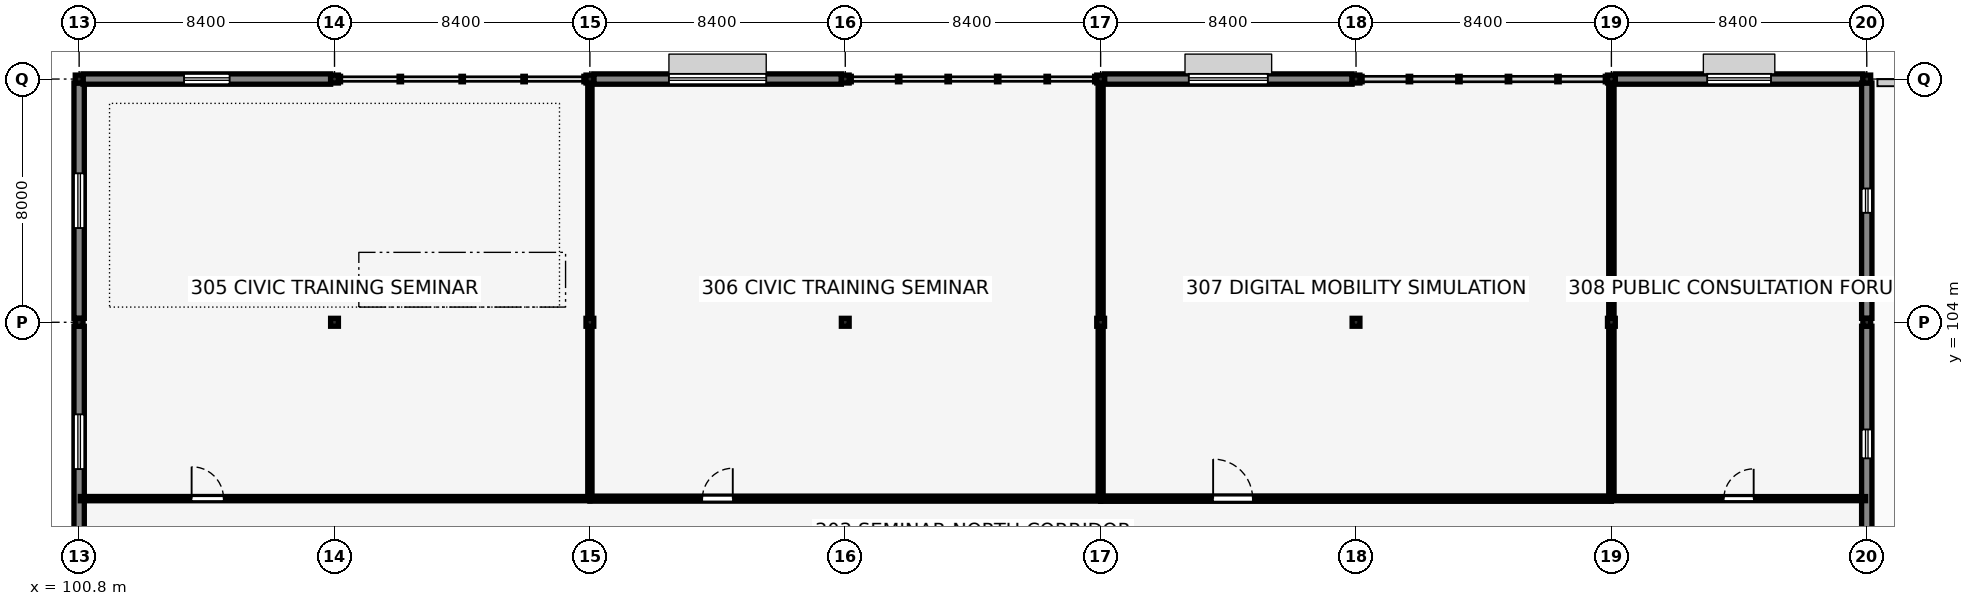
"""IFC4 building model, lengths in metres.
Left out: names, types, materials, properties, quantities, classifications, styles, units other than length and angle.
Written with IfcOpenShell. Run it as: python <this file> out.ifc"""

import sys

from ifc_helpers import new_model, si_unit, direction, frame, frame_2d, origin, origin_2d, place, context, subcontext, project, spatial, rectangle, i_section, extrude, element, fill, save


model = new_model("IFC4")
c1 = context("Model", 3, precision=1e-05, world=origin(), true_north=direction((0.0, 1.0)))
c2 = subcontext(c1, "Body", "Model", "MODEL_VIEW")
j1 = project(units=[si_unit("LENGTHUNIT", "METRE"), si_unit("PLANEANGLEUNIT", "RADIAN")], contexts=[c1])
p1 = place(None, origin())
s1 = spatial("IfcSite", under=j1, at=p1, CompositionType="ELEMENT")
p2 = place(p1, origin())
s2 = spatial("IfcBuilding", under=s1, at=p2, CompositionType="ELEMENT")
p3 = place(p2, frame((0.0, 0.0, 13.36)))
s3 = spatial("IfcBuildingStorey", under=s2, at=p3, CompositionType="ELEMENT", Elevation=13.36)
for number, where, z_axis, x_axis in (
    (1, (100.8, 104.0, 0.0), (0.0, 0.0, 1.0), (1.0, 0.0, 0.0)),
    (2, (100.8, 112.0, 0.0), (0.0, 0.0, 1.0), (1.0, 0.0, 0.0)),
    (3, (109.2, 104.0, 0.0), (0.0, 0.0, 1.0), (1.0, 0.0, 0.0)),
    (4, (109.2, 112.0, 0.0), (0.0, 0.0, 1.0), (1.0, 0.0, 0.0)),
    (5, (117.6, 104.0, 0.0), (0.0, 0.0, 1.0), (1.0, 0.0, 0.0)),
    (6, (117.6, 112.0, 0.0), (0.0, 0.0, 1.0), (1.0, 0.0, 0.0)),
    (7, (126.0, 104.0, 0.0), (0.0, 0.0, 1.0), (1.0, 0.0, 0.0)),
    (8, (126.0, 112.0, 0.0), (0.0, 0.0, 1.0), (1.0, 0.0, 0.0)),
    (9, (134.4, 104.0, 0.0), (0.0, 0.0, 1.0), (1.0, 0.0, 0.0)),
    (10, (134.4, 112.0, 0.0), (0.0, 0.0, 1.0), (1.0, 0.0, 0.0)),
    (11, (142.8, 104.0, 0.0), (0.0, 0.0, 1.0), (1.0, 0.0, 0.0)),
    (12, (142.8, 112.0, 0.0), (0.0, 0.0, 1.0), (1.0, 0.0, 0.0)),
    (13, (151.2, 104.0, 0.0), (0.0, 0.0, 1.0), (1.0, 0.0, 0.0)),
    (14, (151.2, 112.0, 0.0), (0.0, 0.0, 1.0), (1.0, 0.0, 0.0)),
    (15, (159.6, 104.0, 0.0), (0.0, 0.0, 1.0), (1.0, 0.0, 0.0)),
    (16, (159.6, 112.0, 0.0), (0.0, 0.0, 1.0), (1.0, 0.0, 0.0)),
):
    element("IfcColumn", number, at=place(p3, frame(where, z_axis=z_axis, x_axis=x_axis)), inside=s3, PredefinedType="COLUMN", context=c2, shape_type="SweptSolid", body=[
        extrude(i_section(OverallWidth=0.256, OverallDepth=0.26, WebThickness=0.01, FlangeThickness=0.017, FilletRadius=0.013, at=origin_2d()), origin(), (0.0, 0.0, 1.0), 3.58),
    ])
p4 = place(p3, frame((100.8, 96.275, 0.0), z_axis=(0.0, 0.0, 1.0), x_axis=(0.0, 1.0, 0.0)))
e17 = element("IfcWall", 17, at=p4, inside=s3, PredefinedType="SOLIDWALL", context=c2, shape_type="SweptSolid", body=[
    extrude(rectangle(XDim=7.595, YDim=0.34, at=frame_2d((3.797, 0.0))), origin(), (0.0, 0.0, 1.0), 3.28),
])
p5 = place(p4, frame((2.897, 0.0, 0.9), z_axis=(0.0, 0.0, 1.0), x_axis=(1.0, 0.0, 0.0)))
e18 = element("IfcOpeningElement", 18, at=p5, cuts=e17, PredefinedType="OPENING", context=c2, shape_type="SweptSolid", body=[
    extrude(rectangle(XDim=1.8, YDim=1.45, at=frame_2d((0.9, 0.725))), frame((0.0, 0.18, 0.0), z_axis=(0.0, -1.0, 0.0), x_axis=(1.0, 0.0, 0.0)), (0.0, 0.0, 1.0), 0.36),
])
p6 = place(p3, frame((100.8, 104.13, 0.0), z_axis=(0.0, 0.0, 1.0), x_axis=(0.0, 1.0, 0.0)))
e19 = element("IfcWall", 19, at=p6, inside=s3, PredefinedType="SOLIDWALL", context=c2, shape_type="SweptSolid", body=[
    extrude(rectangle(XDim=7.74, YDim=0.34, at=frame_2d((3.87, 0.0))), origin(), (0.0, 0.0, 1.0), 3.28),
])
p7 = place(p6, frame((2.97, 0.0, 0.9), z_axis=(0.0, 0.0, 1.0), x_axis=(1.0, 0.0, 0.0)))
e20 = element("IfcOpeningElement", 20, at=p7, cuts=e19, PredefinedType="OPENING", context=c2, shape_type="SweptSolid", body=[
    extrude(rectangle(XDim=1.8, YDim=1.3, at=frame_2d((0.9, 0.65))), frame((0.0, 0.18, 0.0), z_axis=(0.0, -1.0, 0.0), x_axis=(1.0, 0.0, 0.0)), (0.0, 0.0, 1.0), 0.36),
])
p8 = place(p3, frame((100.928, 112.0, 0.0), z_axis=(0.0, 0.0, 1.0), x_axis=(1.0, 0.0, 0.0)))
e21 = element("IfcWall", 21, at=p8, inside=s3, PredefinedType="SOLIDWALL", context=c2, shape_type="SweptSolid", body=[
    extrude(rectangle(XDim=8.144, YDim=0.34, at=frame_2d((4.072, 0.0))), origin(), (0.0, 0.0, 1.0), 3.28),
])
p9 = place(p8, frame((3.322, 0.0, 0.9), z_axis=(0.0, 0.0, 1.0), x_axis=(1.0, 0.0, 0.0)))
e22 = element("IfcOpeningElement", 22, at=p9, cuts=e21, PredefinedType="OPENING", context=c2, shape_type="SweptSolid", body=[
    extrude(rectangle(XDim=1.5, YDim=1.4, at=frame_2d((0.75, 0.7))), frame((0.0, 0.18, 0.0), z_axis=(0.0, -1.0, 0.0), x_axis=(1.0, 0.0, 0.0)), (0.0, 0.0, 1.0), 0.36),
])
p10 = place(p3, frame((117.728, 112.0, 0.0), z_axis=(0.0, 0.0, 1.0), x_axis=(1.0, 0.0, 0.0)))
e23 = element("IfcWall", 23, at=p10, inside=s3, PredefinedType="SOLIDWALL", context=c2, shape_type="SweptSolid", body=[
    extrude(rectangle(XDim=8.144, YDim=0.34, at=frame_2d((4.072, 0.0))), origin(), (0.0, 0.0, 1.0), 3.28),
])
p11 = place(p10, frame((2.472, 0.0, 1.55), z_axis=(0.0, 0.0, 1.0), x_axis=(1.0, 0.0, 0.0)))
e24 = element("IfcOpeningElement", 24, at=p11, cuts=e23, PredefinedType="OPENING", context=c2, shape_type="SweptSolid", body=[
    extrude(rectangle(XDim=3.2, YDim=0.9, at=frame_2d((1.6, 0.45))), frame((0.0, 0.18, 0.0), z_axis=(0.0, -1.0, 0.0), x_axis=(1.0, 0.0, 0.0)), (0.0, 0.0, 1.0), 0.36),
])
p12 = place(p3, frame((134.528, 112.0, 0.0), z_axis=(0.0, 0.0, 1.0), x_axis=(1.0, 0.0, 0.0)))
e25 = element("IfcWall", 25, at=p12, inside=s3, PredefinedType="SOLIDWALL", context=c2, shape_type="SweptSolid", body=[
    extrude(rectangle(XDim=8.144, YDim=0.34, at=frame_2d((4.072, 0.0))), origin(), (0.0, 0.0, 1.0), 3.28),
])
p13 = place(p12, frame((2.772, 0.0, 1.55), z_axis=(0.0, 0.0, 1.0), x_axis=(1.0, 0.0, 0.0)))
e26 = element("IfcOpeningElement", 26, at=p13, cuts=e25, PredefinedType="OPENING", context=c2, shape_type="SweptSolid", body=[
    extrude(rectangle(XDim=2.6, YDim=0.85, at=frame_2d((1.3, 0.425))), frame((0.0, 0.18, 0.0), z_axis=(0.0, -1.0, 0.0), x_axis=(1.0, 0.0, 0.0)), (0.0, 0.0, 1.0), 0.36),
])
p14 = place(p3, frame((151.328, 112.0, 0.0), z_axis=(0.0, 0.0, 1.0), x_axis=(1.0, 0.0, 0.0)))
e27 = element("IfcWall", 27, at=p14, inside=s3, PredefinedType="SOLIDWALL", context=c2, shape_type="SweptSolid", body=[
    extrude(rectangle(XDim=8.144, YDim=0.34, at=frame_2d((4.072, 0.0))), origin(), (0.0, 0.0, 1.0), 3.28),
])
p15 = place(p14, frame((3.022, 0.0, 1.55), z_axis=(0.0, 0.0, 1.0), x_axis=(1.0, 0.0, 0.0)))
e28 = element("IfcOpeningElement", 28, at=p15, cuts=e27, PredefinedType="OPENING", context=c2, shape_type="SweptSolid", body=[
    extrude(rectangle(XDim=2.1, YDim=0.8, at=frame_2d((1.05, 0.4))), frame((0.0, 0.18, 0.0), z_axis=(0.0, -1.0, 0.0), x_axis=(1.0, 0.0, 0.0)), (0.0, 0.0, 1.0), 0.36),
])
p16 = place(p3, frame((159.6, 96.13, 0.0), z_axis=(0.0, 0.0, 1.0), x_axis=(0.0, 1.0, 0.0)))
e29 = element("IfcWall", 29, at=p16, inside=s3, PredefinedType="SOLIDWALL", context=c2, shape_type="SweptSolid", body=[
    extrude(rectangle(XDim=7.74, YDim=0.34, at=frame_2d((3.87, 0.0))), origin(), (0.0, 0.0, 1.0), 3.28),
])
p17 = place(p16, frame((3.395, 0.0, 0.65), z_axis=(0.0, 0.0, 1.0), x_axis=(1.0, 0.0, 0.0)))
e30 = element("IfcOpeningElement", 30, at=p17, cuts=e29, PredefinedType="OPENING", context=c2, shape_type="SweptSolid", body=[
    extrude(rectangle(XDim=0.95, YDim=2.1, at=frame_2d((0.475, 1.05))), frame((0.0, 0.18, 0.0), z_axis=(0.0, -1.0, 0.0), x_axis=(1.0, 0.0, 0.0)), (0.0, 0.0, 1.0), 0.36),
])
p18 = place(p3, frame((159.6, 104.13, 0.0), z_axis=(0.0, 0.0, 1.0), x_axis=(0.0, 1.0, 0.0)))
e31 = element("IfcWall", 31, at=p18, inside=s3, PredefinedType="SOLIDWALL", context=c2, shape_type="SweptSolid", body=[
    extrude(rectangle(XDim=7.74, YDim=0.34, at=frame_2d((3.87, 0.0))), origin(), (0.0, 0.0, 1.0), 3.28),
])
p19 = place(p18, frame((3.47, 0.0, 0.65), z_axis=(0.0, 0.0, 1.0), x_axis=(1.0, 0.0, 0.0)))
e32 = element("IfcOpeningElement", 32, at=p19, cuts=e31, PredefinedType="OPENING", context=c2, shape_type="SweptSolid", body=[
    extrude(rectangle(XDim=0.8, YDim=1.85, at=frame_2d((0.4, 0.925))), frame((0.0, 0.18, 0.0), z_axis=(0.0, -1.0, 0.0), x_axis=(1.0, 0.0, 0.0)), (0.0, 0.0, 1.0), 0.36),
])
p20 = place(p3, frame((159.95, 111.88, 0.0), z_axis=(0.0, 0.0, 1.0), x_axis=(1.0, 0.0, 0.0)))
e33 = element("IfcWall", 33, at=p20, inside=s3, PredefinedType="PARAPET", context=c2, shape_type="SweptSolid", body=[
    extrude(rectangle(XDim=7.93, YDim=0.23, at=frame_2d((3.965, 0.0))), origin(), (0.0, 0.0, 1.0), 1.05),
])
p21 = place(p3, frame((100.84, 98.2, 0.0), z_axis=(0.0, 0.0, 1.0), x_axis=(1.0, 0.0, 0.0)))
e34 = element("IfcWall", 34, at=p21, inside=s3, PredefinedType="PARTITIONING", context=c2, shape_type="SweptSolid", body=[
    extrude(rectangle(XDim=16.76, YDim=0.14, at=frame_2d((8.38, 0.0))), origin(), (0.0, 0.0, 1.0), 3.58),
])
p22 = place(p21, frame((3.66, 0.0, 0.0), z_axis=(0.0, 0.0, 1.0), x_axis=(1.0, 0.0, 0.0)))
e35 = element("IfcOpeningElement", 35, at=p22, cuts=e34, PredefinedType="OPENING", context=c2, shape_type="SweptSolid", body=[
    extrude(rectangle(XDim=1.05, YDim=2.15, at=frame_2d((0.525, 1.075))), frame((0.0, 0.08, 0.0), z_axis=(0.0, -1.0, 0.0), x_axis=(1.0, 0.0, 0.0)), (0.0, 0.0, 1.0), 0.16),
])
p23 = place(p3, frame((117.6, 98.2, 0.0), z_axis=(0.0, 0.0, 1.0), x_axis=(1.0, 0.0, 0.0)))
e36 = element("IfcWall", 36, at=p23, inside=s3, PredefinedType="PARTITIONING", context=c2, shape_type="SweptSolid", body=[
    extrude(rectangle(XDim=16.8, YDim=0.165, at=frame_2d((8.4, 0.0))), origin(), (0.0, 0.0, 1.0), 3.58),
])
p24 = place(p23, frame((3.7, 0.0, 0.0), z_axis=(0.0, 0.0, 1.0), x_axis=(1.0, 0.0, 0.0)))
e37 = element("IfcOpeningElement", 37, at=p24, cuts=e36, PredefinedType="OPENING", context=c2, shape_type="SweptSolid", body=[
    extrude(rectangle(XDim=1.0, YDim=2.15, at=frame_2d((0.5, 1.075))), frame((0.0, 0.093, 0.0), z_axis=(0.0, -1.0, 0.0), x_axis=(1.0, 0.0, 0.0)), (0.0, 0.0, 1.0), 0.185),
])
p25 = place(p3, frame((134.4, 98.2, 0.0), z_axis=(0.0, 0.0, 1.0), x_axis=(1.0, 0.0, 0.0)))
e38 = element("IfcWall", 38, at=p25, inside=s3, PredefinedType="PARTITIONING", context=c2, shape_type="SweptSolid", body=[
    extrude(rectangle(XDim=16.8, YDim=0.175, at=frame_2d((8.4, 0.0))), origin(), (0.0, 0.0, 1.0), 3.126),
])
p26 = place(p25, frame((3.7, 0.0, 0.0), z_axis=(0.0, 0.0, 1.0), x_axis=(1.0, 0.0, 0.0)))
e39 = element("IfcOpeningElement", 39, at=p26, cuts=e38, PredefinedType="OPENING", context=c2, shape_type="SweptSolid", body=[
    extrude(rectangle(XDim=1.3, YDim=2.25, at=frame_2d((0.65, 1.125))), frame((0.0, 0.097, 0.0), z_axis=(0.0, -1.0, 0.0), x_axis=(1.0, 0.0, 0.0)), (0.0, 0.0, 1.0), 0.195),
])
p27 = place(p3, frame((151.2, 98.2, 0.0), z_axis=(0.0, 0.0, 1.0), x_axis=(1.0, 0.0, 0.0)))
e40 = element("IfcWall", 40, at=p27, inside=s3, PredefinedType="PARTITIONING", context=c2, shape_type="SweptSolid", body=[
    extrude(rectangle(XDim=8.36, YDim=0.135, at=frame_2d((4.18, 0.0))), origin(), (0.0, 0.0, 1.0), 3.58),
])
p28 = place(p27, frame((3.7, 0.0, 0.0), z_axis=(0.0, 0.0, 1.0), x_axis=(1.0, 0.0, 0.0)))
e41 = element("IfcOpeningElement", 41, at=p28, cuts=e40, PredefinedType="OPENING", context=c2, shape_type="SweptSolid", body=[
    extrude(rectangle(XDim=0.98, YDim=2.15, at=frame_2d((0.49, 1.075))), frame((0.0, 0.077, 0.0), z_axis=(0.0, -1.0, 0.0), x_axis=(1.0, 0.0, 0.0)), (0.0, 0.0, 1.0), 0.155),
])
p29 = place(p3, frame((117.6, 98.2, 0.0), z_axis=(0.0, 0.0, 1.0), x_axis=(0.0, 1.0, 0.0)))
e42 = element("IfcWall", 42, at=p29, inside=s3, PredefinedType="PARTITIONING", context=c2, shape_type="SweptSolid", body=[
    extrude(rectangle(XDim=5.68, YDim=0.14, at=frame_2d((2.84, 0.0))), origin(), (0.0, 0.0, 1.0), 3.126),
])
p30 = place(p3, frame((117.6, 104.12, 0.0), z_axis=(0.0, 0.0, 1.0), x_axis=(0.0, 1.0, 0.0)))
e43 = element("IfcWall", 43, at=p30, inside=s3, PredefinedType="PARTITIONING", context=c2, shape_type="SweptSolid", body=[
    extrude(rectangle(XDim=7.76, YDim=0.14, at=frame_2d((3.88, 0.0))), origin(), (0.0, 0.0, 1.0), 3.126),
])
p31 = place(p3, frame((134.4, 98.2, 0.0), z_axis=(0.0, 0.0, 1.0), x_axis=(0.0, 1.0, 0.0)))
e44 = element("IfcWall", 44, at=p31, inside=s3, PredefinedType="PARTITIONING", context=c2, shape_type="SweptSolid", body=[
    extrude(rectangle(XDim=5.68, YDim=0.165, at=frame_2d((2.84, 0.0))), origin(), (0.0, 0.0, 1.0), 3.126),
])
p32 = place(p3, frame((134.4, 104.12, 0.0), z_axis=(0.0, 0.0, 1.0), x_axis=(0.0, 1.0, 0.0)))
e45 = element("IfcWall", 45, at=p32, inside=s3, PredefinedType="PARTITIONING", context=c2, shape_type="SweptSolid", body=[
    extrude(rectangle(XDim=7.76, YDim=0.165, at=frame_2d((3.88, 0.0))), origin(), (0.0, 0.0, 1.0), 3.126),
])
p33 = place(p3, frame((151.2, 98.2, 0.0), z_axis=(0.0, 0.0, 1.0), x_axis=(0.0, 1.0, 0.0)))
e46 = element("IfcWall", 46, at=p33, inside=s3, PredefinedType="PARTITIONING", context=c2, shape_type="SweptSolid", body=[
    extrude(rectangle(XDim=5.68, YDim=0.175, at=frame_2d((2.84, 0.0))), origin(), (0.0, 0.0, 1.0), 3.126),
])
p34 = place(p3, frame((151.2, 104.12, 0.0), z_axis=(0.0, 0.0, 1.0), x_axis=(0.0, 1.0, 0.0)))
e47 = element("IfcWall", 47, at=p34, inside=s3, PredefinedType="PARTITIONING", context=c2, shape_type="SweptSolid", body=[
    extrude(rectangle(XDim=7.76, YDim=0.175, at=frame_2d((3.88, 0.0))), origin(), (0.0, 0.0, 1.0), 3.126),
])
p35 = place(p5, origin())
e48 = element("IfcWindow", 48, at=p35, inside=s3, PartitioningType="DOUBLE_PANEL_VERTICAL", PredefinedType="WINDOW", context=c2, shape_type="SweptSolid", body=[
    extrude(rectangle(XDim=1.8, YDim=1.45, at=frame_2d((0.9, 0.725))), frame((0.0, 0.03, 0.0), z_axis=(0.0, -1.0, 0.0), x_axis=(1.0, 0.0, 0.0)), (0.0, 0.0, 1.0), 0.06),
])
fill(e18, e48)
p36 = place(p7, origin())
e49 = element("IfcWindow", 49, at=p36, inside=s3, PartitioningType="DOUBLE_PANEL_VERTICAL", PredefinedType="WINDOW", context=c2, shape_type="SweptSolid", body=[
    extrude(rectangle(XDim=1.8, YDim=1.3, at=frame_2d((0.9, 0.65))), frame((0.0, 0.03, 0.0), z_axis=(0.0, -1.0, 0.0), x_axis=(1.0, 0.0, 0.0)), (0.0, 0.0, 1.0), 0.06),
])
fill(e20, e49)
p37 = place(p9, origin())
e50 = element("IfcWindow", 50, at=p37, inside=s3, PartitioningType="SINGLE_PANEL", PredefinedType="WINDOW", context=c2, shape_type="SweptSolid", body=[
    extrude(rectangle(XDim=1.5, YDim=1.4, at=frame_2d((0.75, 0.7))), frame((0.0, 0.03, 0.0), z_axis=(0.0, -1.0, 0.0), x_axis=(1.0, 0.0, 0.0)), (0.0, 0.0, 1.0), 0.06),
])
fill(e22, e50)
p38 = place(p11, origin())
e51 = element("IfcWindow", 51, at=p38, inside=s3, PartitioningType="TRIPLE_PANEL_HORIZONTAL", PredefinedType="WINDOW", context=c2, shape_type="SweptSolid", body=[
    extrude(rectangle(XDim=3.2, YDim=0.9, at=frame_2d((1.6, 0.45))), frame((0.0, 0.03, 0.0), z_axis=(0.0, -1.0, 0.0), x_axis=(1.0, 0.0, 0.0)), (0.0, 0.0, 1.0), 0.06),
])
fill(e24, e51)
p39 = place(p13, origin())
e52 = element("IfcWindow", 52, at=p39, inside=s3, PartitioningType="DOUBLE_PANEL_HORIZONTAL", PredefinedType="WINDOW", context=c2, shape_type="SweptSolid", body=[
    extrude(rectangle(XDim=2.6, YDim=0.85, at=frame_2d((1.3, 0.425))), frame((0.0, 0.03, 0.0), z_axis=(0.0, -1.0, 0.0), x_axis=(1.0, 0.0, 0.0)), (0.0, 0.0, 1.0), 0.06),
])
fill(e26, e52)
p40 = place(p15, origin())
e53 = element("IfcWindow", 53, at=p40, inside=s3, PartitioningType="DOUBLE_PANEL_HORIZONTAL", PredefinedType="WINDOW", context=c2, shape_type="SweptSolid", body=[
    extrude(rectangle(XDim=2.1, YDim=0.8, at=frame_2d((1.05, 0.4))), frame((0.0, 0.03, 0.0), z_axis=(0.0, -1.0, 0.0), x_axis=(1.0, 0.0, 0.0)), (0.0, 0.0, 1.0), 0.06),
])
fill(e28, e53)
p41 = place(p17, origin())
e54 = element("IfcWindow", 54, at=p41, inside=s3, PartitioningType="SINGLE_PANEL", PredefinedType="WINDOW", context=c2, shape_type="SweptSolid", body=[
    extrude(rectangle(XDim=0.95, YDim=2.1, at=frame_2d((0.475, 1.05))), frame((0.0, 0.03, 0.0), z_axis=(0.0, -1.0, 0.0), x_axis=(1.0, 0.0, 0.0)), (0.0, 0.0, 1.0), 0.06),
])
fill(e30, e54)
p42 = place(p19, origin())
e55 = element("IfcWindow", 55, at=p42, inside=s3, PartitioningType="SINGLE_PANEL", PredefinedType="WINDOW", context=c2, shape_type="SweptSolid", body=[
    extrude(rectangle(XDim=0.8, YDim=1.85, at=frame_2d((0.4, 0.925))), frame((0.0, 0.03, 0.0), z_axis=(0.0, -1.0, 0.0), x_axis=(1.0, 0.0, 0.0)), (0.0, 0.0, 1.0), 0.06),
])
fill(e32, e55)
p43 = place(p22, origin())
e56 = element("IfcDoor", 56, at=p43, inside=s3, OperationType="SINGLE_SWING_LEFT", PredefinedType="DOOR", context=c2, shape_type="SweptSolid", body=[
    extrude(rectangle(XDim=1.05, YDim=2.15, at=frame_2d((0.525, 1.075))), frame((0.0, 0.025, 0.0), z_axis=(0.0, -1.0, 0.0), x_axis=(1.0, 0.0, 0.0)), (0.0, 0.0, 1.0), 0.05),
])
fill(e35, e56)
p44 = place(p24, origin())
e57 = element("IfcDoor", 57, at=p44, inside=s3, OperationType="SINGLE_SWING_RIGHT", PredefinedType="DOOR", context=c2, shape_type="SweptSolid", body=[
    extrude(rectangle(XDim=1.0, YDim=2.15, at=frame_2d((0.5, 1.075))), frame((0.0, 0.025, 0.0), z_axis=(0.0, -1.0, 0.0), x_axis=(1.0, 0.0, 0.0)), (0.0, 0.0, 1.0), 0.05),
])
fill(e37, e57)
p45 = place(p26, origin())
e58 = element("IfcDoor", 58, at=p45, inside=s3, OperationType="SINGLE_SWING_LEFT", PredefinedType="DOOR", context=c2, shape_type="SweptSolid", body=[
    extrude(rectangle(XDim=1.3, YDim=2.25, at=frame_2d((0.65, 1.125))), frame((0.0, 0.025, 0.0), z_axis=(0.0, -1.0, 0.0), x_axis=(1.0, 0.0, 0.0)), (0.0, 0.0, 1.0), 0.05),
])
fill(e39, e58)
p46 = place(p28, origin())
e59 = element("IfcDoor", 59, at=p46, inside=s3, OperationType="SINGLE_SWING_RIGHT", PredefinedType="DOOR", context=c2, shape_type="SweptSolid", body=[
    extrude(rectangle(XDim=0.98, YDim=2.15, at=frame_2d((0.49, 1.075))), frame((0.0, 0.025, 0.0), z_axis=(0.0, -1.0, 0.0), x_axis=(1.0, 0.0, 0.0)), (0.0, 0.0, 1.0), 0.05),
])
fill(e41, e59)
save(model, sys.argv[1])
